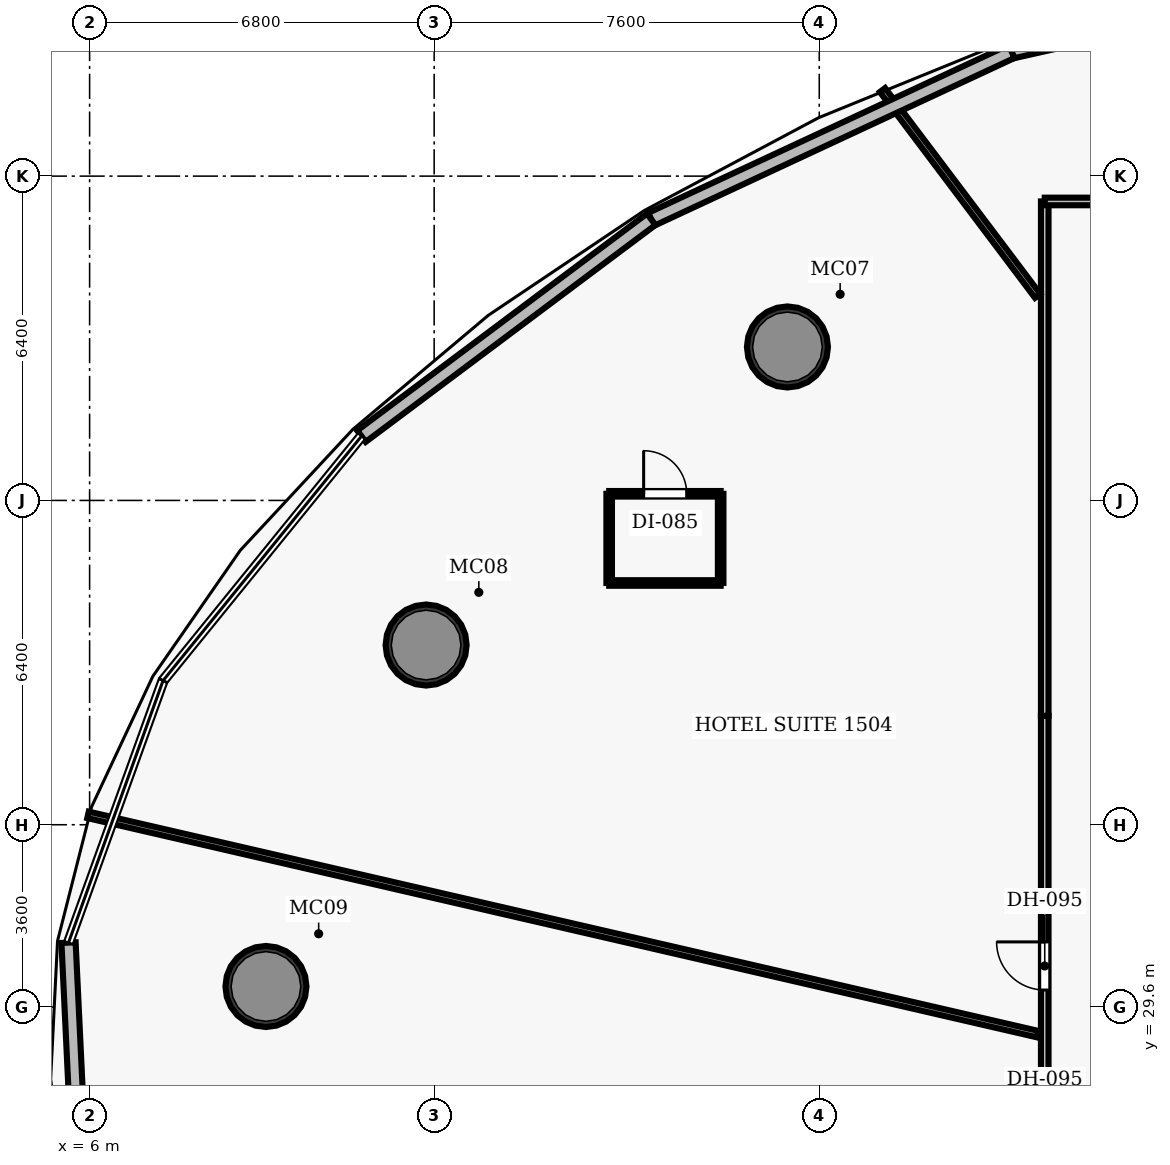
"""IFC4 building model, lengths in metres.
Left out: names, types, materials, properties, quantities, classifications, styles, units other than length and angle.
Written with IfcOpenShell. Run it as: python <this file> out.ifc"""

import sys

from ifc_helpers import new_model, si_unit, direction, frame, frame_2d, origin, origin_2d, place, context, subcontext, project, spatial, rectangle, hollow_circle, extrude, element, fill, save


model = new_model("IFC4")
c1 = context("Model", 3, precision=1e-05, world=origin(), true_north=direction((0.0, 1.0)))
c2 = subcontext(c1, "Body", "Model", "MODEL_VIEW")
j1 = project(units=[si_unit("LENGTHUNIT", "METRE"), si_unit("PLANEANGLEUNIT", "RADIAN")], contexts=[c1])
p1 = place(None, origin())
s1 = spatial("IfcSite", under=j1, at=p1, CompositionType="ELEMENT")
p2 = place(p1, origin())
s2 = spatial("IfcBuilding", under=s1, at=p2, CompositionType="ELEMENT")
p3 = place(p2, frame((0.0, 0.0, 69.4)))
s3 = spatial("IfcBuildingStorey", under=s2, at=p3, CompositionType="ELEMENT", Elevation=69.4)
for number, where, z_axis, x_axis in (
    (1, (19.772, 42.629, 0.0), (0.0, 0.0, 1.0), (1.0, 0.0, 0.0)),
    (2, (12.641, 36.746, 0.0), (0.0, 0.0, 1.0), (1.0, 0.0, 0.0)),
    (3, (9.48, 30.008, 0.0), (0.0, 0.0, 1.0), (1.0, 0.0, 0.0)),
):
    element("IfcColumn", number, at=place(p3, frame(where, z_axis=z_axis, x_axis=x_axis)), inside=s3, PredefinedType="COLUMN", context=c2, shape_type="SweptSolid", body=[
        extrude(hollow_circle(Radius=0.8, WallThickness=0.06, at=origin_2d()), origin(), (0.0, 0.0, 1.0), 3.5),
    ])
p4 = place(p3, frame((24.85, 19.45, 0.0), z_axis=(0.0, 0.0, 1.0), x_axis=(0.0, 1.0, 0.0)))
e4 = element("IfcWall", 4, at=p4, inside=s3, PredefinedType="PARTITIONING", context=c2, shape_type="SweptSolid", body=[
    extrude(rectangle(XDim=15.9, YDim=0.15, at=frame_2d((7.95, 0.0))), origin(), (0.0, 0.0, 1.0), 2.6),
])
p5 = place(p4, frame((10.488, 0.0, 0.0)))
e5 = element("IfcOpeningElement", 5, at=p5, cuts=e4, PredefinedType="OPENING", context=c2, shape_type="SweptSolid", body=[
    extrude(rectangle(XDim=0.95, YDim=2.15, at=frame_2d((0.475, 1.075))), frame((0.0, 0.085, 0.0), z_axis=(0.0, -1.0, 0.0), x_axis=(1.0, 0.0, 0.0)), (0.0, 0.0, 1.0), 0.17),
])
p6 = place(p4, frame((6.958, 0.0, 0.0)))
e6 = element("IfcOpeningElement", 6, at=p6, cuts=e4, PredefinedType="OPENING", context=c2, shape_type="SweptSolid", body=[
    extrude(rectangle(XDim=0.95, YDim=2.15, at=frame_2d((0.475, 1.075))), frame((0.0, 0.085, 0.0), z_axis=(0.0, -1.0, 0.0), x_axis=(1.0, 0.0, 0.0)), (0.0, 0.0, 1.0), 0.17),
])
p7 = place(p3, frame((24.85, 35.35, 0.0), z_axis=(0.0, 0.0, 1.0), x_axis=(0.0, 1.0, 0.0)))
e7 = element("IfcWall", 7, at=p7, inside=s3, PredefinedType="PARTITIONING", context=c2, shape_type="SweptSolid", body=[
    extrude(rectangle(XDim=10.15, YDim=0.15, at=frame_2d((5.075, 0.0))), origin(), (0.0, 0.0, 1.0), 2.6),
])
p8 = place(p3, frame((24.85, 45.5, 0.0), z_axis=(0.0, 0.0, 1.0), x_axis=(1.0, 0.0, 0.0)))
e8 = element("IfcWall", 8, at=p8, inside=s3, PredefinedType="PARTITIONING", context=c2, shape_type="SweptSolid", body=[
    extrude(rectangle(XDim=2.8, YDim=0.15, at=frame_2d((1.4, 0.0))), origin(), (0.0, 0.0, 1.0), 2.6),
])
p9 = place(p3, frame((24.71, 43.636, 0.0), z_axis=(0.0, 0.0, 1.0), x_axis=(-0.601818300029, 0.798633040733, 0.0)))
e9 = element("IfcWall", 9, at=p9, inside=s3, PredefinedType="PARTITIONING", context=c2, shape_type="SweptSolid", body=[
    extrude(rectangle(XDim=5.087, YDim=0.13, at=frame_2d((2.543, 0.0))), origin(), (0.0, 0.0, 1.0), 2.6),
])
p10 = place(p3, frame((24.71, 29.068, 0.0), z_axis=(0.0, 0.0, 1.0), x_axis=(-0.974369585044, 0.224953132321, 0.0)))
e10 = element("IfcWall", 10, at=p10, inside=s3, PredefinedType="PARTITIONING", context=c2, shape_type="SweptSolid", body=[
    extrude(rectangle(XDim=19.235, YDim=0.13, at=frame_2d((9.617, 0.0))), origin(), (0.0, 0.0, 1.0), 2.6),
])
p11 = place(p3, frame((16.254, 37.971, 0.0), z_axis=(0.0, 0.0, 1.0), x_axis=(1.0, 0.0, 0.0)))
e11 = element("IfcWall", 11, at=p11, inside=s3, PredefinedType="PARTITIONING", context=c2, shape_type="SweptSolid", body=[
    extrude(rectangle(XDim=2.2, YDim=0.11, at=frame_2d((1.1, 0.0))), origin(), (0.0, 0.0, 1.0), 2.6),
])
p12 = place(p3, frame((16.254, 39.731, 0.0), z_axis=(0.0, 0.0, 1.0), x_axis=(1.0, 0.0, 0.0)))
e12 = element("IfcWall", 12, at=p12, inside=s3, PredefinedType="PARTITIONING", context=c2, shape_type="SweptSolid", body=[
    extrude(rectangle(XDim=2.2, YDim=0.11, at=frame_2d((1.1, 0.0))), origin(), (0.0, 0.0, 1.0), 2.6),
])
p13 = place(p12, frame((0.68, 0.0, 0.0)))
e13 = element("IfcOpeningElement", 13, at=p13, cuts=e12, PredefinedType="OPENING", context=c2, shape_type="SweptSolid", body=[
    extrude(rectangle(XDim=0.85, YDim=2.1, at=frame_2d((0.425, 1.05))), frame((0.0, 0.065, 0.0), z_axis=(0.0, -1.0, 0.0), x_axis=(1.0, 0.0, 0.0)), (0.0, 0.0, 1.0), 0.13),
])
for number, where, z_axis, x_axis in (
    (14, (16.254, 37.971, 0.0), (0.0, 0.0, 1.0), (0.0, 1.0, 0.0)),
    (15, (18.454, 37.971, 0.0), (0.0, 0.0, 1.0), (0.0, 1.0, 0.0)),
):
    element("IfcWall", number, at=place(p3, frame(where, z_axis=z_axis, x_axis=x_axis)), inside=s3, PredefinedType="PARTITIONING", context=c2, shape_type="SweptSolid", body=[
        extrude(rectangle(XDim=1.76, YDim=0.11, at=frame_2d((0.88, 0.0))), origin(), (0.0, 0.0, 1.0), 2.6),
    ])
p14 = place(p3, frame((24.196, 48.459, 0.0), z_axis=(0.0, 0.0, 1.0), x_axis=(0.975627030245, 0.219435407023, 0.0)))
e16 = element("IfcWall", 16, at=p14, inside=s3, PredefinedType="SOLIDWALL", context=c2, shape_type="SweptSolid", body=[
    extrude(rectangle(XDim=8.171, YDim=0.28, at=frame_2d((4.085, 0.0))), origin(), (0.0, 0.0, 1.0), 3.25),
])
p15 = place(p3, frame((17.084, 45.147, 0.0), z_axis=(0.0, 0.0, 1.0), x_axis=(0.90655249664, 0.422093083142, 0.0)))
e17 = element("IfcWall", 17, at=p15, inside=s3, PredefinedType="SOLIDWALL", context=c2, shape_type="SweptSolid", body=[
    extrude(rectangle(XDim=7.845, YDim=0.28, at=frame_2d((3.922, 0.0))), origin(), (0.0, 0.0, 1.0), 3.25),
])
p16 = place(p3, frame((11.365, 40.867, 0.0), z_axis=(0.0, 0.0, 1.0), x_axis=(0.800594336171, 0.599206733015, 0.0)))
e18 = element("IfcWall", 18, at=p16, inside=s3, PredefinedType="SOLIDWALL", context=c2, shape_type="SweptSolid", body=[
    extrude(rectangle(XDim=7.143, YDim=0.28, at=frame_2d((3.571, 0.0))), origin(), (0.0, 0.0, 1.0), 3.25),
])
p17 = place(p3, frame((5.847, 25.382, 0.0), z_axis=(0.0, 0.0, 1.0), x_axis=(-0.047784583266, 0.998857664336, 0.0)))
e19 = element("IfcWall", 19, at=p17, inside=s3, PredefinedType="SOLIDWALL", context=c2, shape_type="SweptSolid", body=[
    extrude(rectangle(XDim=5.498, YDim=0.28, at=frame_2d((2.749, 0.0))), origin(), (0.0, 0.0, 1.0), 3.25),
])
p18 = place(p5, origin())
e20 = element("IfcDoor", 20, at=p18, inside=s3, OperationType="SINGLE_SWING_RIGHT", PredefinedType="DOOR", context=c2, shape_type="SweptSolid", body=[
    extrude(rectangle(XDim=0.95, YDim=2.15, at=frame_2d((0.475, 1.075))), frame((0.0, 0.025, 0.0), z_axis=(0.0, -1.0, 0.0), x_axis=(1.0, 0.0, 0.0)), (0.0, 0.0, 1.0), 0.05),
])
fill(e5, e20)
p19 = place(p13, origin())
e21 = element("IfcDoor", 21, at=p19, inside=s3, OperationType="SINGLE_SWING_LEFT", PredefinedType="DOOR", context=c2, shape_type="SweptSolid", body=[
    extrude(rectangle(XDim=0.85, YDim=2.1, at=frame_2d((0.425, 1.05))), frame((0.0, 0.025, 0.0), z_axis=(0.0, -1.0, 0.0), x_axis=(1.0, 0.0, 0.0)), (0.0, 0.0, 1.0), 0.05),
])
fill(e13, e21)
save(model, sys.argv[1])
